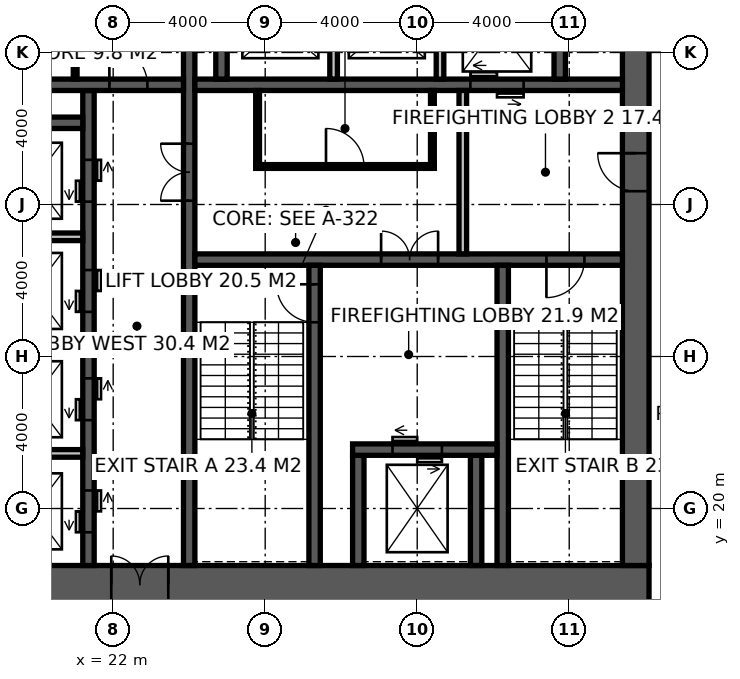
"""IFC4 building model, lengths in metres.
Left out: names, types, materials, properties, quantities, classifications, styles, units other than length and angle.
Written with IfcOpenShell. Run it as: python <this file> out.ifc"""

import sys

from ifc_helpers import new_model, si_unit, direction, frame, frame_2d, origin, place, context, subcontext, project, spatial, rectangle, extrude, element, fill, save


model = new_model("IFC4")
c1 = context("Model", 3, precision=1e-05, world=origin(), true_north=direction((0.0, 1.0)))
c2 = subcontext(c1, "Body", "Model", "MODEL_VIEW")
j1 = project(units=[si_unit("LENGTHUNIT", "METRE"), si_unit("PLANEANGLEUNIT", "RADIAN")], contexts=[c1])
p1 = place(None, origin())
s1 = spatial("IfcSite", under=j1, at=p1, CompositionType="ELEMENT")
p2 = place(p1, origin())
s2 = spatial("IfcBuilding", under=s1, at=p2, CompositionType="ELEMENT")
p3 = place(p2, frame((0.0, 0.0, 105.4)))
s3 = spatial("IfcBuildingStorey", under=s2, at=p3, CompositionType="ELEMENT", Elevation=105.4)
p4 = place(p3, frame((18.5, 18.0, -0.15), z_axis=(0.0, 0.0, 1.0), x_axis=(1.0, 0.0, 0.0)))
e1 = element("IfcWall", 1, at=p4, inside=s3, PredefinedType="SHEAR", context=c2, shape_type="SweptSolid", body=[
    extrude(rectangle(XDim=17.6, YDim=1.0, at=frame_2d((8.8, 0.0))), origin(), (0.0, 0.0, 1.0), 4.0),
])
p5 = place(p4, frame((3.45, 0.0, 0.15)))
e2 = element("IfcOpeningElement", 2, at=p5, cuts=e1, PredefinedType="OPENING", context=c2, shape_type="SweptSolid", body=[
    extrude(rectangle(XDim=1.5, YDim=2.4, at=frame_2d((0.75, 1.2))), frame((0.0, 0.51, 0.0), z_axis=(0.0, -1.0, 0.0), x_axis=(1.0, 0.0, 0.0)), (0.0, 0.0, 1.0), 1.02),
])
p6 = place(p3, frame((35.75, 18.5, -0.15), z_axis=(0.0, 0.0, 1.0), x_axis=(0.0, 1.0, 0.0)))
e3 = element("IfcWall", 3, at=p6, inside=s3, PredefinedType="SHEAR", context=c2, shape_type="SweptSolid", body=[
    extrude(rectangle(XDim=17.0, YDim=0.7, at=frame_2d((8.5, 0.0))), origin(), (0.0, 0.0, 1.0), 4.0),
])
p7 = place(p6, frame((9.85, 0.0, 0.15)))
e4 = element("IfcOpeningElement", 4, at=p7, cuts=e3, PredefinedType="OPENING", context=c2, shape_type="SweptSolid", body=[
    extrude(rectangle(XDim=1.0, YDim=2.2, at=frame_2d((0.5, 1.1))), frame((0.0, 0.36, 0.0), z_axis=(0.0, -1.0, 0.0), x_axis=(1.0, 0.0, 0.0)), (0.0, 0.0, 1.0), 0.72),
])
p8 = place(p3, frame((24.0, 18.5, -0.15), z_axis=(0.0, 0.0, 1.0), x_axis=(0.0, 1.0, 0.0)))
e5 = element("IfcWall", 5, at=p8, inside=s3, PredefinedType="SHEAR", context=c2, shape_type="SweptSolid", body=[
    extrude(rectangle(XDim=17.0, YDim=0.3, at=frame_2d((8.5, 0.0))), origin(), (0.0, 0.0, 1.0), 4.0),
])
p9 = place(p8, frame((9.6, 0.0, 0.15)))
e6 = element("IfcOpeningElement", 6, at=p9, cuts=e5, PredefinedType="OPENING", context=c2, shape_type="SweptSolid", body=[
    extrude(rectangle(XDim=1.5, YDim=2.4, at=frame_2d((0.75, 1.2))), frame((0.0, 0.16, 0.0), z_axis=(0.0, -1.0, 0.0), x_axis=(1.0, 0.0, 0.0)), (0.0, 0.0, 1.0), 0.32),
])
p10 = place(p3, frame((24.15, 26.55, -0.15), z_axis=(0.0, 0.0, 1.0), x_axis=(1.0, 0.0, 0.0)))
e7 = element("IfcWall", 7, at=p10, inside=s3, PredefinedType="SHEAR", context=c2, shape_type="SweptSolid", body=[
    extrude(rectangle(XDim=11.25, YDim=0.3, at=frame_2d((5.625, 0.0))), origin(), (0.0, 0.0, 1.0), 4.0),
])
p11 = place(p10, frame((9.25, 0.0, 0.15)))
e8 = element("IfcOpeningElement", 8, at=p11, cuts=e7, PredefinedType="OPENING", context=c2, shape_type="SweptSolid", body=[
    extrude(rectangle(XDim=1.0, YDim=2.2, at=frame_2d((0.5, 1.1))), frame((0.0, 0.16, 0.0), z_axis=(0.0, -1.0, 0.0), x_axis=(1.0, 0.0, 0.0)), (0.0, 0.0, 1.0), 0.32),
])
p12 = place(p10, frame((4.9, 0.0, 0.15)))
e9 = element("IfcOpeningElement", 9, at=p12, cuts=e7, PredefinedType="OPENING", context=c2, shape_type="SweptSolid", body=[
    extrude(rectangle(XDim=1.5, YDim=2.4, at=frame_2d((0.75, 1.2))), frame((0.0, 0.16, 0.0), z_axis=(0.0, -1.0, 0.0), x_axis=(1.0, 0.0, 0.0)), (0.0, 0.0, 1.0), 0.32),
])
p13 = place(p3, frame((27.3, 18.5, -0.15), z_axis=(0.0, 0.0, 1.0), x_axis=(0.0, 1.0, 0.0)))
e10 = element("IfcWall", 10, at=p13, inside=s3, PredefinedType="SHEAR", context=c2, shape_type="SweptSolid", body=[
    extrude(rectangle(XDim=7.9, YDim=0.3, at=frame_2d((3.95, 0.0))), origin(), (0.0, 0.0, 1.0), 4.0),
])
p14 = place(p13, frame((6.4, 0.0, 0.15)))
e11 = element("IfcOpeningElement", 11, at=p14, cuts=e10, PredefinedType="OPENING", context=c2, shape_type="SweptSolid", body=[
    extrude(rectangle(XDim=1.0, YDim=2.2, at=frame_2d((0.5, 1.1))), frame((0.0, 0.16, 0.0), z_axis=(0.0, -1.0, 0.0), x_axis=(1.0, 0.0, 0.0)), (0.0, 0.0, 1.0), 0.32),
])
p15 = place(p3, frame((32.25, 18.5, -0.15), z_axis=(0.0, 0.0, 1.0), x_axis=(0.0, 1.0, 0.0)))
e12 = element("IfcWall", 12, at=p15, inside=s3, PredefinedType="SHEAR", context=c2, shape_type="SweptSolid", body=[
    extrude(rectangle(XDim=7.9, YDim=0.3, at=frame_2d((3.95, 0.0))), origin(), (0.0, 0.0, 1.0), 4.0),
])
for number, where, z_axis, x_axis in (
    (13, (28.45, 18.5, -0.15), (0.0, 0.0, 1.0), (0.0, 1.0, 0.0)),
    (14, (31.55, 18.5, -0.15), (0.0, 0.0, 1.0), (0.0, 1.0, 0.0)),
):
    element("IfcWall", number, at=place(p3, frame(where, z_axis=z_axis, x_axis=x_axis)), inside=s3, PredefinedType="SHEAR", context=c2, shape_type="SweptSolid", body=[
        extrude(rectangle(XDim=2.9, YDim=0.3, at=frame_2d((1.45, 0.0))), origin(), (0.0, 0.0, 1.0), 4.0),
    ])
p16 = place(p3, frame((28.3, 21.55, -0.15), z_axis=(0.0, 0.0, 1.0), x_axis=(1.0, 0.0, 0.0)))
e15 = element("IfcWall", 15, at=p16, inside=s3, PredefinedType="SHEAR", context=c2, shape_type="SweptSolid", body=[
    extrude(rectangle(XDim=3.8, YDim=0.3, at=frame_2d((1.9, 0.0))), origin(), (0.0, 0.0, 1.0), 4.0),
])
p17 = place(p16, frame((1.05, 0.0, 0.15)))
e16 = element("IfcOpeningElement", 16, at=p17, cuts=e15, PredefinedType="OPENING", context=c2, shape_type="SweptSolid", body=[
    extrude(rectangle(XDim=1.3, YDim=2.4, at=frame_2d((0.65, 1.2))), frame((0.0, 0.16, 0.0), z_axis=(0.0, -1.0, 0.0), x_axis=(1.0, 0.0, 0.0)), (0.0, 0.0, 1.0), 0.32),
])
p18 = place(p3, frame((24.15, 31.15, -0.15), z_axis=(0.0, 0.0, 1.0), x_axis=(1.0, 0.0, 0.0)))
e17 = element("IfcWall", 17, at=p18, inside=s3, PredefinedType="SHEAR", context=c2, shape_type="SweptSolid", body=[
    extrude(rectangle(XDim=11.25, YDim=0.3, at=frame_2d((5.625, 0.0))), origin(), (0.0, 0.0, 1.0), 4.0),
])
p19 = place(p18, frame((7.25, 0.0, 0.15)))
e18 = element("IfcOpeningElement", 18, at=p19, cuts=e17, PredefinedType="OPENING", context=c2, shape_type="SweptSolid", body=[
    extrude(rectangle(XDim=1.4, YDim=2.4, at=frame_2d((0.7, 1.2))), frame((0.0, 0.16, 0.0), z_axis=(0.0, -1.0, 0.0), x_axis=(1.0, 0.0, 0.0)), (0.0, 0.0, 1.0), 0.32),
])
p20 = place(p3, frame((21.35, 18.5, -0.15), z_axis=(0.0, 0.0, 1.0), x_axis=(0.0, 1.0, 0.0)))
e19 = element("IfcWall", 19, at=p20, inside=s3, PredefinedType="SHEAR", context=c2, shape_type="SweptSolid", body=[
    extrude(rectangle(XDim=12.5, YDim=0.3, at=frame_2d((6.25, 0.0))), origin(), (0.0, 0.0, 1.0), 4.0),
])
p21 = place(p20, frame((0.875, 0.0, 0.15)))
e20 = element("IfcOpeningElement", 20, at=p21, cuts=e19, PredefinedType="OPENING", context=c2, shape_type="SweptSolid", body=[
    extrude(rectangle(XDim=1.1, YDim=2.2, at=frame_2d((0.55, 1.1))), frame((0.0, 0.16, 0.0), z_axis=(0.0, -1.0, 0.0), x_axis=(1.0, 0.0, 0.0)), (0.0, 0.0, 1.0), 0.32),
])
p22 = place(p20, frame((3.825, 0.0, 0.15)))
e21 = element("IfcOpeningElement", 21, at=p22, cuts=e19, PredefinedType="OPENING", context=c2, shape_type="SweptSolid", body=[
    extrude(rectangle(XDim=1.1, YDim=2.2, at=frame_2d((0.55, 1.1))), frame((0.0, 0.16, 0.0), z_axis=(0.0, -1.0, 0.0), x_axis=(1.0, 0.0, 0.0)), (0.0, 0.0, 1.0), 0.32),
])
p23 = place(p20, frame((6.675, 0.0, 0.15)))
e22 = element("IfcOpeningElement", 22, at=p23, cuts=e19, PredefinedType="OPENING", context=c2, shape_type="SweptSolid", body=[
    extrude(rectangle(XDim=1.1, YDim=2.2, at=frame_2d((0.55, 1.1))), frame((0.0, 0.16, 0.0), z_axis=(0.0, -1.0, 0.0), x_axis=(1.0, 0.0, 0.0)), (0.0, 0.0, 1.0), 0.32),
])
p24 = place(p20, frame((9.575, 0.0, 0.15)))
e23 = element("IfcOpeningElement", 23, at=p24, cuts=e19, PredefinedType="OPENING", context=c2, shape_type="SweptSolid", body=[
    extrude(rectangle(XDim=1.1, YDim=2.2, at=frame_2d((0.55, 1.1))), frame((0.0, 0.16, 0.0), z_axis=(0.0, -1.0, 0.0), x_axis=(1.0, 0.0, 0.0)), (0.0, 0.0, 1.0), 0.32),
])
p25 = place(p3, frame((18.5, 31.15, -0.15), z_axis=(0.0, 0.0, 1.0), x_axis=(1.0, 0.0, 0.0)))
e24 = element("IfcWall", 24, at=p25, inside=s3, PredefinedType="SHEAR", context=c2, shape_type="SweptSolid", body=[
    extrude(rectangle(XDim=5.35, YDim=0.3, at=frame_2d((2.675, 0.0))), origin(), (0.0, 0.0, 1.0), 4.0),
])
p26 = place(p25, frame((3.4, 0.0, 0.15)))
e25 = element("IfcOpeningElement", 25, at=p26, cuts=e24, PredefinedType="OPENING", context=c2, shape_type="SweptSolid", body=[
    extrude(rectangle(XDim=1.0, YDim=2.2, at=frame_2d((0.5, 1.1))), frame((0.0, 0.16, 0.0), z_axis=(0.0, -1.0, 0.0), x_axis=(1.0, 0.0, 0.0)), (0.0, 0.0, 1.0), 0.32),
])
p27 = place(p3, frame((18.5, 30.15, -0.15), z_axis=(0.0, 0.0, 1.0), x_axis=(1.0, 0.0, 0.0)))
e26 = element("IfcWall", 26, at=p27, inside=s3, PredefinedType="SHEAR", context=c2, shape_type="SweptSolid", body=[
    extrude(rectangle(XDim=2.7, YDim=0.3, at=frame_2d((1.35, 0.0))), origin(), (0.0, 0.0, 1.0), 4.0),
])
for number, where, z_axis, x_axis in (
    (27, (24.85, 31.3, -0.15), (0.0, 0.0, 1.0), (0.0, 1.0, 0.0)),
    (28, (33.75, 31.3, -0.15), (0.0, 0.0, 1.0), (0.0, 1.0, 0.0)),
):
    element("IfcWall", number, at=place(p3, frame(where, z_axis=z_axis, x_axis=x_axis)), inside=s3, PredefinedType="SHEAR", context=c2, shape_type="SweptSolid", body=[
        extrude(rectangle(XDim=4.2, YDim=0.3, at=frame_2d((2.1, 0.0))), origin(), (0.0, 0.0, 1.0), 4.0),
    ])
for number, where, z_axis, x_axis in (
    (29, (27.8, 31.3, -0.15), (0.0, 0.0, 1.0), (0.0, 1.0, 0.0)),
    (30, (30.6, 31.3, -0.15), (0.0, 0.0, 1.0), (0.0, 1.0, 0.0)),
):
    element("IfcWall", number, at=place(p3, frame(where, z_axis=z_axis, x_axis=x_axis)), inside=s3, PredefinedType="SOLIDWALL", context=c2, shape_type="SweptSolid", body=[
        extrude(rectangle(XDim=2.8, YDim=0.2, at=frame_2d((1.4, 0.0))), origin(), (0.0, 0.0, 1.0), 4.0),
    ])
for number, where, z_axis, x_axis in (
    (31, (18.5, 21.45, -0.15), (0.0, 0.0, 1.0), (1.0, 0.0, 0.0)),
    (32, (18.5, 24.3, -0.15), (0.0, 0.0, 1.0), (1.0, 0.0, 0.0)),
    (33, (18.5, 27.15, -0.15), (0.0, 0.0, 1.0), (1.0, 0.0, 0.0)),
):
    element("IfcWall", number, at=place(p3, frame(where, z_axis=z_axis, x_axis=x_axis)), inside=s3, PredefinedType="SOLIDWALL", context=c2, shape_type="SweptSolid", body=[
        extrude(rectangle(XDim=2.7, YDim=0.2, at=frame_2d((1.35, 0.0))), origin(), (0.0, 0.0, 1.0), 4.0),
    ])
p28 = place(p3, frame((31.2, 26.7, 0.0), z_axis=(0.0, 0.0, 1.0), x_axis=(0.0, 1.0, 0.0)))
e34 = element("IfcWall", 34, at=p28, inside=s3, PredefinedType="SOLIDWALL", context=c2, shape_type="SweptSolid", body=[
    extrude(rectangle(XDim=4.3, YDim=0.2, at=frame_2d((2.15, 0.0))), origin(), (0.0, 0.0, 1.0), 3.85),
])
p29 = place(p3, frame((21.0, 31.3, 0.0), z_axis=(0.0, 0.0, 1.0), x_axis=(0.0, 1.0, 0.0)))
e35 = element("IfcWall", 35, at=p29, inside=s3, PredefinedType="PARTITIONING", context=c2, shape_type="SweptSolid", body=[
    extrude(rectangle(XDim=4.2, YDim=0.1, at=frame_2d((2.1, 0.0))), origin(), (0.0, 0.0, 1.0), 3.85),
])
p30 = place(p29, frame((1.55, 0.0, 0.0)))
e36 = element("IfcOpeningElement", 36, at=p30, cuts=e35, PredefinedType="OPENING", context=c2, shape_type="SweptSolid", body=[
    extrude(rectangle(XDim=1.0, YDim=2.2, at=frame_2d((0.5, 1.1))), frame((0.0, 0.06, 0.0), z_axis=(0.0, -1.0, 0.0), x_axis=(1.0, 0.0, 0.0)), (0.0, 0.0, 1.0), 0.12),
])
p31 = place(p3, frame((25.75, 29.0, 0.0), z_axis=(0.0, 0.0, 1.0), x_axis=(1.0, 0.0, 0.0)))
e37 = element("IfcWall", 37, at=p31, inside=s3, PredefinedType="PARTITIONING", context=c2, shape_type="SweptSolid", body=[
    extrude(rectangle(XDim=4.7, YDim=0.1, at=frame_2d((2.35, 0.0))), origin(), (0.0, 0.0, 1.0), 3.85),
])
p32 = place(p31, frame((1.85, 0.0, 0.0)))
e38 = element("IfcOpeningElement", 38, at=p32, cuts=e37, PredefinedType="OPENING", context=c2, shape_type="SweptSolid", body=[
    extrude(rectangle(XDim=1.0, YDim=2.2, at=frame_2d((0.5, 1.1))), frame((0.0, 0.06, 0.0), z_axis=(0.0, -1.0, 0.0), x_axis=(1.0, 0.0, 0.0)), (0.0, 0.0, 1.0), 0.12),
])
for number, where, z_axis, x_axis in (
    (39, (25.8, 29.05, 0.0), (0.0, 0.0, 1.0), (0.0, 1.0, 0.0)),
    (40, (30.4, 29.05, 0.0), (0.0, 0.0, 1.0), (0.0, 1.0, 0.0)),
):
    element("IfcWall", number, at=place(p3, frame(where, z_axis=z_axis, x_axis=x_axis)), inside=s3, PredefinedType="PARTITIONING", context=c2, shape_type="SweptSolid", body=[
        extrude(rectangle(XDim=1.95, YDim=0.1, at=frame_2d((0.975, 0.0))), origin(), (0.0, 0.0, 1.0), 3.85),
    ])
p33 = place(p14, origin())
e41 = element("IfcDoor", 41, at=p33, inside=s3, OperationType="SINGLE_SWING_RIGHT", PredefinedType="DOOR", context=c2, shape_type="SweptSolid", body=[
    extrude(rectangle(XDim=1.0, YDim=2.2, at=frame_2d((0.5, 1.1))), frame((0.0, 0.025, 0.0), z_axis=(0.0, -1.0, 0.0), x_axis=(1.0, 0.0, 0.0)), (0.0, 0.0, 1.0), 0.05),
])
fill(e11, e41)
p34 = place(p11, frame((1.0, 0.0, 0.0), z_axis=(0.0, 0.0, 1.0), x_axis=(-1.0, 0.0, 0.0)))
e42 = element("IfcDoor", 42, at=p34, inside=s3, OperationType="SINGLE_SWING_RIGHT", PredefinedType="DOOR", context=c2, shape_type="SweptSolid", body=[
    extrude(rectangle(XDim=1.0, YDim=2.2, at=frame_2d((0.5, 1.1))), frame((0.0, 0.025, 0.0), z_axis=(0.0, -1.0, 0.0), x_axis=(1.0, 0.0, 0.0)), (0.0, 0.0, 1.0), 0.05),
])
fill(e8, e42)
p35 = place(p7, origin())
e43 = element("IfcDoor", 43, at=p35, inside=s3, OperationType="SINGLE_SWING_RIGHT", PredefinedType="DOOR", context=c2, shape_type="SweptSolid", body=[
    extrude(rectangle(XDim=1.0, YDim=2.2, at=frame_2d((0.5, 1.1))), frame((0.0, 0.025, 0.0), z_axis=(0.0, -1.0, 0.0), x_axis=(1.0, 0.0, 0.0)), (0.0, 0.0, 1.0), 0.05),
])
fill(e4, e43)
p36 = place(p12, origin())
e44 = element("IfcDoor", 44, at=p36, inside=s3, OperationType="DOUBLE_DOOR_DOUBLE_SWING", PredefinedType="DOOR", context=c2, shape_type="SweptSolid", body=[
    extrude(rectangle(XDim=1.5, YDim=2.4, at=frame_2d((0.75, 1.2))), frame((0.0, 0.025, 0.0), z_axis=(0.0, -1.0, 0.0), x_axis=(1.0, 0.0, 0.0)), (0.0, 0.0, 1.0), 0.05),
])
fill(e9, e44)
p37 = place(p9, origin())
e45 = element("IfcDoor", 45, at=p37, inside=s3, OperationType="DOUBLE_DOOR_DOUBLE_SWING", PredefinedType="DOOR", context=c2, shape_type="SweptSolid", body=[
    extrude(rectangle(XDim=1.5, YDim=2.4, at=frame_2d((0.75, 1.2))), frame((0.0, 0.025, 0.0), z_axis=(0.0, -1.0, 0.0), x_axis=(1.0, 0.0, 0.0)), (0.0, 0.0, 1.0), 0.05),
])
fill(e6, e45)
p38 = place(p26, origin())
e46 = element("IfcDoor", 46, at=p38, inside=s3, OperationType="SINGLE_SWING_LEFT", PredefinedType="DOOR", context=c2, shape_type="SweptSolid", body=[
    extrude(rectangle(XDim=1.0, YDim=2.2, at=frame_2d((0.5, 1.1))), frame((0.0, 0.025, 0.0), z_axis=(0.0, -1.0, 0.0), x_axis=(1.0, 0.0, 0.0)), (0.0, 0.0, 1.0), 0.05),
])
fill(e25, e46)
p39 = place(p32, origin())
e47 = element("IfcDoor", 47, at=p39, inside=s3, OperationType="SINGLE_SWING_LEFT", PredefinedType="DOOR", context=c2, shape_type="SweptSolid", body=[
    extrude(rectangle(XDim=1.0, YDim=2.2, at=frame_2d((0.5, 1.1))), frame((0.0, 0.025, 0.0), z_axis=(0.0, -1.0, 0.0), x_axis=(1.0, 0.0, 0.0)), (0.0, 0.0, 1.0), 0.05),
])
fill(e38, e47)
p40 = place(p5, origin())
e48 = element("IfcDoor", 48, at=p40, inside=s3, OperationType="DOUBLE_DOOR_DOUBLE_SWING", PredefinedType="DOOR", context=c2, shape_type="SweptSolid", body=[
    extrude(rectangle(XDim=1.5, YDim=2.4, at=frame_2d((0.75, 1.2))), frame((0.0, 0.025, 0.0), z_axis=(0.0, -1.0, 0.0), x_axis=(1.0, 0.0, 0.0)), (0.0, 0.0, 1.0), 0.05),
])
fill(e2, e48)
p41 = place(p17, origin())
e49 = element("IfcDoor", 49, at=p41, inside=s3, OperationType="DOUBLE_DOOR_SLIDING", PredefinedType="DOOR", context=c2, shape_type="SweptSolid", body=[
    extrude(rectangle(XDim=1.3, YDim=2.4, at=frame_2d((0.65, 1.2))), frame((0.0, 0.025, 0.0), z_axis=(0.0, -1.0, 0.0), x_axis=(1.0, 0.0, 0.0)), (0.0, 0.0, 1.0), 0.05),
])
fill(e16, e49)
p42 = place(p19, origin())
e50 = element("IfcDoor", 50, at=p42, inside=s3, OperationType="DOUBLE_DOOR_SLIDING", PredefinedType="DOOR", context=c2, shape_type="SweptSolid", body=[
    extrude(rectangle(XDim=1.4, YDim=2.4, at=frame_2d((0.7, 1.2))), frame((0.0, 0.025, 0.0), z_axis=(0.0, -1.0, 0.0), x_axis=(1.0, 0.0, 0.0)), (0.0, 0.0, 1.0), 0.05),
])
fill(e18, e50)
p43 = place(p21, origin())
e51 = element("IfcDoor", 51, at=p43, inside=s3, OperationType="DOUBLE_DOOR_SLIDING", PredefinedType="DOOR", context=c2, shape_type="SweptSolid", body=[
    extrude(rectangle(XDim=1.1, YDim=2.2, at=frame_2d((0.55, 1.1))), frame((0.0, 0.025, 0.0), z_axis=(0.0, -1.0, 0.0), x_axis=(1.0, 0.0, 0.0)), (0.0, 0.0, 1.0), 0.05),
])
fill(e20, e51)
p44 = place(p22, origin())
e52 = element("IfcDoor", 52, at=p44, inside=s3, OperationType="DOUBLE_DOOR_SLIDING", PredefinedType="DOOR", context=c2, shape_type="SweptSolid", body=[
    extrude(rectangle(XDim=1.1, YDim=2.2, at=frame_2d((0.55, 1.1))), frame((0.0, 0.025, 0.0), z_axis=(0.0, -1.0, 0.0), x_axis=(1.0, 0.0, 0.0)), (0.0, 0.0, 1.0), 0.05),
])
fill(e21, e52)
p45 = place(p23, origin())
e53 = element("IfcDoor", 53, at=p45, inside=s3, OperationType="DOUBLE_DOOR_SLIDING", PredefinedType="DOOR", context=c2, shape_type="SweptSolid", body=[
    extrude(rectangle(XDim=1.1, YDim=2.2, at=frame_2d((0.55, 1.1))), frame((0.0, 0.025, 0.0), z_axis=(0.0, -1.0, 0.0), x_axis=(1.0, 0.0, 0.0)), (0.0, 0.0, 1.0), 0.05),
])
fill(e22, e53)
p46 = place(p24, origin())
e54 = element("IfcDoor", 54, at=p46, inside=s3, OperationType="DOUBLE_DOOR_SLIDING", PredefinedType="DOOR", context=c2, shape_type="SweptSolid", body=[
    extrude(rectangle(XDim=1.1, YDim=2.2, at=frame_2d((0.55, 1.1))), frame((0.0, 0.025, 0.0), z_axis=(0.0, -1.0, 0.0), x_axis=(1.0, 0.0, 0.0)), (0.0, 0.0, 1.0), 0.05),
])
fill(e23, e54)
save(model, sys.argv[1])
